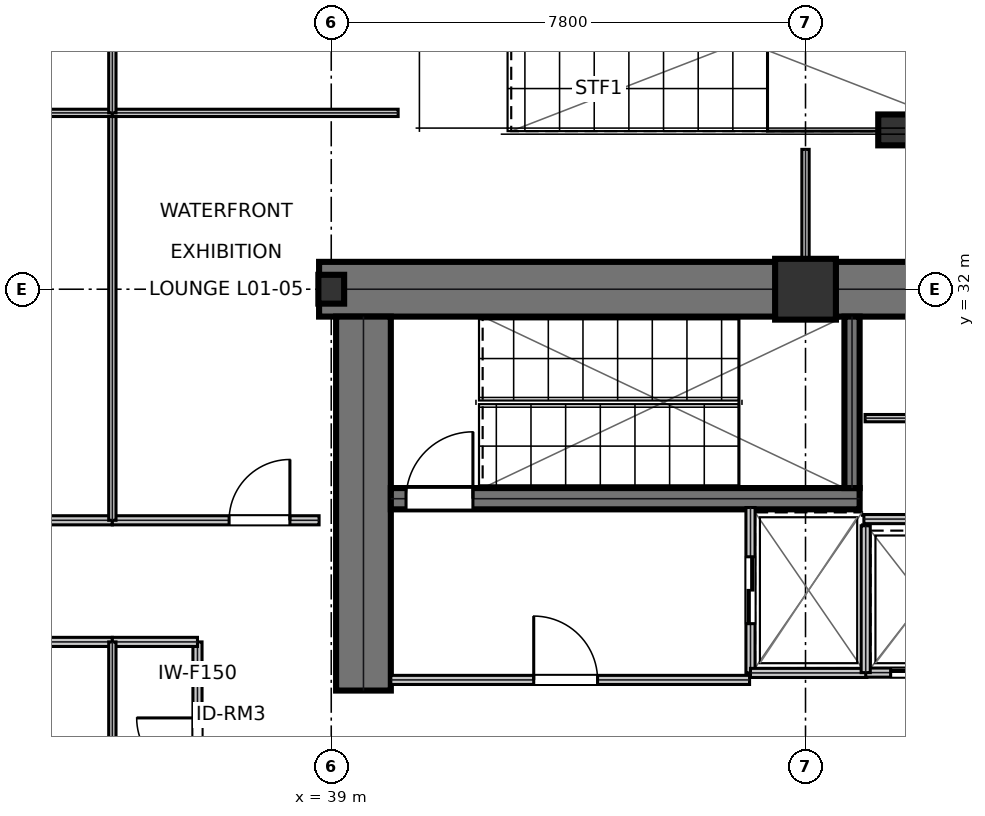
"""IFC4 building model, lengths in metres.
Left out: names, types, materials, properties, quantities, classifications, styles, units other than length and angle.
Written with IfcOpenShell. Run it as: python <this file> out.ifc"""

import sys

from ifc_helpers import new_model, si_unit, direction, frame, frame_2d, origin, origin_2d, place, context, subcontext, project, spatial, rectangle, hollow_circle, i_section, extrude, element, fill, save


model = new_model("IFC4")
c1 = context("Model", 3, precision=1e-05, world=origin(), true_north=direction((0.0, 1.0)))
c2 = subcontext(c1, "Body", "Model", "MODEL_VIEW")
j1 = project(units=[si_unit("LENGTHUNIT", "METRE"), si_unit("PLANEANGLEUNIT", "RADIAN")], contexts=[c1])
p1 = place(None, origin())
s1 = spatial("IfcSite", under=j1, at=p1, CompositionType="ELEMENT")
p2 = place(p1, origin())
s2 = spatial("IfcBuilding", under=s1, at=p2, CompositionType="ELEMENT")
p3 = place(p2, frame((0.0, 0.0, 5.4)))
s3 = spatial("IfcBuildingStorey", under=s2, at=p3, CompositionType="ELEMENT", Elevation=5.4)
p4 = place(p3, frame((38.8, 32.0, 0.0), z_axis=(0.0, 0.0, 1.0), x_axis=(1.0, 0.0, 0.0)))
e1 = element("IfcWall", 1, at=p4, inside=s3, PredefinedType="SHEAR", context=c2, shape_type="SweptSolid", body=[
    extrude(rectangle(XDim=16.0, YDim=0.9, at=frame_2d((8.0, 0.0))), origin(), (0.0, 0.0, 1.0), 5.12),
])
p5 = place(p3, frame((39.53, 25.4, 0.0), z_axis=(0.0, 0.0, 1.0), x_axis=(0.0, 1.0, 0.0)))
e2 = element("IfcWall", 2, at=p5, inside=s3, PredefinedType="SHEAR", context=c2, shape_type="SweptSolid", body=[
    extrude(rectangle(XDim=6.15, YDim=0.9, at=frame_2d((3.075, 0.0))), origin(), (0.0, 0.0, 1.0), 5.12),
])
p6 = place(p3, frame((39.98, 28.555, 0.0), z_axis=(0.0, 0.0, 1.0), x_axis=(1.0, 0.0, 0.0)))
e3 = element("IfcWall", 3, at=p6, inside=s3, PredefinedType="SHEAR", context=c2, shape_type="SweptSolid", body=[
    extrude(rectangle(XDim=7.71, YDim=0.35, at=frame_2d((3.855, 0.0))), origin(), (0.0, 0.0, 1.0), 5.12),
])
p7 = place(p6, frame((0.25, 0.0, 0.0)))
e4 = element("IfcOpeningElement", 4, at=p7, cuts=e3, PredefinedType="OPENING", context=c2, shape_type="SweptSolid", body=[
    extrude(rectangle(XDim=1.1, YDim=2.15, at=frame_2d((0.55, 1.075))), frame((0.0, 0.185, 0.0), z_axis=(0.0, -1.0, 0.0), x_axis=(1.0, 0.0, 0.0)), (0.0, 0.0, 1.0), 0.37),
])
p8 = place(p3, frame((47.565, 28.73, 0.0), z_axis=(0.0, 0.0, 1.0), x_axis=(0.0, 1.0, 0.0)))
e5 = element("IfcWall", 5, at=p8, inside=s3, PredefinedType="SHEAR", context=c2, shape_type="SweptSolid", body=[
    extrude(rectangle(XDim=2.82, YDim=0.25, at=frame_2d((1.41, 0.0))), origin(), (0.0, 0.0, 1.0), 5.12),
])
p9 = place(p3, frame((39.0, 32.0, 0.0), z_axis=(0.0, 0.0, 1.0), x_axis=(1.0, 0.0, 0.0)))
e6 = element("IfcColumn", 6, at=p9, inside=s3, PredefinedType="COLUMN", context=c2, shape_type="SweptSolid", body=[
    extrude(i_section(OverallWidth=0.424, OverallDepth=0.474, WebThickness=0.048, FlangeThickness=0.077, at=origin_2d()), origin(), (0.0, 0.0, 1.0), 5.395),
])
p10 = place(p3, frame((46.8, 32.0, 0.0), z_axis=(0.0, 0.0, 1.0), x_axis=(1.0, 0.0, 0.0)))
e7 = element("IfcColumn", 7, at=p10, inside=s3, PredefinedType="COLUMN", context=c2, shape_type="SweptSolid", body=[
    extrude(rectangle(XDim=1.0, YDim=1.0, at=origin_2d()), origin(), (0.0, 0.0, 1.0), 5.395),
])
p11 = place(p3, frame((48.25, 34.62, 0.0), z_axis=(0.0, 0.0, 1.0), x_axis=(1.0, 0.0, 0.0)))
e8 = element("IfcColumn", 8, at=p11, inside=s3, PredefinedType="COLUMN", context=c2, shape_type="SweptSolid", body=[
    extrude(hollow_circle(Radius=0.254, WallThickness=0.02, at=origin_2d()), origin(), (0.0, 0.0, 1.0), 5.394),
])
p12 = place(p3, frame((39.98, 25.575, 0.0), z_axis=(0.0, 0.0, 1.0), x_axis=(1.0, 0.0, 0.0)))
e9 = element("IfcWall", 9, at=p12, inside=s3, PredefinedType="PARTITIONING", context=c2, shape_type="SweptSolid", body=[
    extrude(rectangle(XDim=5.9, YDim=0.15, at=frame_2d((2.95, 0.0))), origin(), (0.0, 0.0, 1.0), 5.12),
])
p13 = place(p12, frame((2.35, 0.0, 0.0)))
e10 = element("IfcOpeningElement", 10, at=p13, cuts=e9, PredefinedType="OPENING", context=c2, shape_type="SweptSolid", body=[
    extrude(rectangle(XDim=1.05, YDim=2.15, at=frame_2d((0.525, 1.075))), frame((0.0, 0.085, 0.0), z_axis=(0.0, -1.0, 0.0), x_axis=(1.0, 0.0, 0.0)), (0.0, 0.0, 1.0), 0.17),
])
p14 = place(p3, frame((45.895, 25.69, 0.0), z_axis=(0.0, 0.0, 1.0), x_axis=(0.0, 1.0, 0.0)))
e11 = element("IfcWall", 11, at=p14, inside=s3, PredefinedType="PARTITIONING", context=c2, shape_type="SweptSolid", body=[
    extrude(rectangle(XDim=2.72, YDim=0.15, at=frame_2d((1.36, 0.0))), origin(), (0.0, 0.0, 1.0), 5.12),
])
p15 = place(p14, frame((0.81, 0.0, 0.0)))
e12 = element("IfcOpeningElement", 12, at=p15, cuts=e11, PredefinedType="OPENING", context=c2, shape_type="SweptSolid", body=[
    extrude(rectangle(XDim=1.1, YDim=2.15, at=frame_2d((0.55, 1.075))), frame((0.0, 0.085, 0.0), z_axis=(0.0, -1.0, 0.0), x_axis=(1.0, 0.0, 0.0)), (0.0, 0.0, 1.0), 0.17),
])
p16 = place(p3, frame((45.895, 25.69, 0.0), z_axis=(0.0, 0.0, 1.0), x_axis=(1.0, 0.0, 0.0)))
e13 = element("IfcWall", 13, at=p16, inside=s3, PredefinedType="PARTITIONING", context=c2, shape_type="SweptSolid", body=[
    extrude(rectangle(XDim=1.915, YDim=0.15, at=frame_2d((0.958, 0.0))), origin(), (0.0, 0.0, 1.0), 5.12),
])
p17 = place(p3, frame((47.79, 25.695, 0.0), z_axis=(0.0, 0.0, 1.0), x_axis=(1.0, 0.0, 0.0)))
e14 = element("IfcWall", 14, at=p17, inside=s3, PredefinedType="PARTITIONING", context=c2, shape_type="SweptSolid", body=[
    extrude(rectangle(XDim=1.92, YDim=0.15, at=frame_2d((0.96, 0.0))), origin(), (0.0, 0.0, 1.0), 5.12),
])
p18 = place(p17, frame((0.41, 0.0, 0.0)))
e15 = element("IfcOpeningElement", 15, at=p18, cuts=e14, PredefinedType="OPENING", context=c2, shape_type="SweptSolid", body=[
    extrude(rectangle(XDim=1.1, YDim=2.15, at=frame_2d((0.55, 1.075))), frame((0.0, 0.085, 0.0), z_axis=(0.0, -1.0, 0.0), x_axis=(1.0, 0.0, 0.0)), (0.0, 0.0, 1.0), 0.17),
])
p19 = place(p3, frame((47.79, 25.695, 0.0), z_axis=(0.0, 0.0, 1.0), x_axis=(0.0, 1.0, 0.0)))
e16 = element("IfcWall", 16, at=p19, inside=s3, PredefinedType="PARTITIONING", context=c2, shape_type="SweptSolid", body=[
    extrude(rectangle(XDim=2.415, YDim=0.15, at=frame_2d((1.208, 0.0))), origin(), (0.0, 0.0, 1.0), 5.12),
])
p20 = place(p3, frame((47.76, 28.22, 0.0), z_axis=(0.0, 0.0, 1.0), x_axis=(1.0, 0.0, 0.0)))
e17 = element("IfcWall", 17, at=p20, inside=s3, PredefinedType="PARTITIONING", context=c2, shape_type="SweptSolid", body=[
    extrude(rectangle(XDim=1.96, YDim=0.15, at=frame_2d((0.98, 0.0))), origin(), (0.0, 0.0, 1.0), 5.12),
])
p21 = place(p3, frame((47.78, 29.88, 0.0), z_axis=(0.0, 0.0, 1.0), x_axis=(1.0, 0.0, 0.0)))
e18 = element("IfcWall", 18, at=p21, inside=s3, PredefinedType="PARTITIONING", context=c2, shape_type="SweptSolid", body=[
    extrude(rectangle(XDim=1.92, YDim=0.12, at=frame_2d((0.96, 0.0))), origin(), (0.0, 0.0, 1.0), 5.12),
])
p22 = place(p3, frame((36.8, 22.7, 0.0), z_axis=(0.0, 0.0, 1.0), x_axis=(0.0, 1.0, 0.0)))
e19 = element("IfcWall", 19, at=p22, inside=s3, PredefinedType="PARTITIONING", context=c2, shape_type="SweptSolid", body=[
    extrude(rectangle(XDim=3.5, YDim=0.15, at=frame_2d((1.75, 0.0))), origin(), (0.0, 0.0, 1.0), 4.338),
])
p23 = place(p22, frame((1.25, 0.0, 0.0)))
e20 = element("IfcOpeningElement", 20, at=p23, cuts=e19, PredefinedType="OPENING", context=c2, shape_type="SweptSolid", body=[
    extrude(rectangle(XDim=1.0, YDim=2.15, at=frame_2d((0.5, 1.075))), frame((0.0, 0.085, 0.0), z_axis=(0.0, -1.0, 0.0), x_axis=(1.0, 0.0, 0.0)), (0.0, 0.0, 1.0), 0.17),
])
p24 = place(p3, frame((28.2, 26.2, 0.0), z_axis=(0.0, 0.0, 1.0), x_axis=(1.0, 0.0, 0.0)))
e21 = element("IfcWall", 21, at=p24, inside=s3, PredefinedType="PARTITIONING", context=c2, shape_type="SweptSolid", body=[
    extrude(rectangle(XDim=7.2, YDim=0.15, at=frame_2d((3.6, 0.0))), origin(), (0.0, 0.0, 1.0), 4.415),
])
p25 = place(p24, frame((3.1, 0.0, 0.0)))
e22 = element("IfcOpeningElement", 22, at=p25, cuts=e21, PredefinedType="OPENING", context=c2, shape_type="SweptSolid", body=[
    extrude(rectangle(XDim=1.0, YDim=2.15, at=frame_2d((0.5, 1.075))), frame((0.0, 0.085, 0.0), z_axis=(0.0, -1.0, 0.0), x_axis=(1.0, 0.0, 0.0)), (0.0, 0.0, 1.0), 0.17),
])
p26 = place(p3, frame((28.2, 28.2, 0.0), z_axis=(0.0, 0.0, 1.0), x_axis=(1.0, 0.0, 0.0)))
e23 = element("IfcWall", 23, at=p26, inside=s3, PredefinedType="PARTITIONING", context=c2, shape_type="SweptSolid", body=[
    extrude(rectangle(XDim=7.2, YDim=0.15, at=frame_2d((3.6, 0.0))), origin(), (0.0, 0.0, 1.0), 4.415),
])
p27 = place(p26, frame((3.1, 0.0, 0.0)))
e24 = element("IfcOpeningElement", 24, at=p27, cuts=e23, PredefinedType="OPENING", context=c2, shape_type="SweptSolid", body=[
    extrude(rectangle(XDim=1.0, YDim=2.15, at=frame_2d((0.5, 1.075))), frame((0.0, 0.085, 0.0), z_axis=(0.0, -1.0, 0.0), x_axis=(1.0, 0.0, 0.0)), (0.0, 0.0, 1.0), 0.17),
])
p28 = place(p3, frame((35.4, 28.2, 0.0), z_axis=(0.0, 0.0, 1.0), x_axis=(1.0, 0.0, 0.0)))
e25 = element("IfcWall", 25, at=p28, inside=s3, PredefinedType="PARTITIONING", context=c2, shape_type="SweptSolid", body=[
    extrude(rectangle(XDim=3.4, YDim=0.15, at=frame_2d((1.7, 0.0))), origin(), (0.0, 0.0, 1.0), 5.12),
])
p29 = place(p28, frame((1.92, 0.0, 0.0)))
e26 = element("IfcOpeningElement", 26, at=p29, cuts=e25, PredefinedType="OPENING", context=c2, shape_type="SweptSolid", body=[
    extrude(rectangle(XDim=1.0, YDim=2.15, at=frame_2d((0.5, 1.075))), frame((0.0, 0.085, 0.0), z_axis=(0.0, -1.0, 0.0), x_axis=(1.0, 0.0, 0.0)), (0.0, 0.0, 1.0), 0.17),
])
p30 = place(p3, frame((35.4, 26.2, 0.0), z_axis=(0.0, 0.0, 1.0), x_axis=(1.0, 0.0, 0.0)))
e27 = element("IfcWall", 27, at=p30, inside=s3, PredefinedType="PARTITIONING", context=c2, shape_type="SweptSolid", body=[
    extrude(rectangle(XDim=1.4, YDim=0.15, at=frame_2d((0.7, 0.0))), origin(), (0.0, 0.0, 1.0), 5.12),
])
p31 = place(p3, frame((35.4, 20.0, 0.0), z_axis=(0.0, 0.0, 1.0), x_axis=(0.0, 1.0, 0.0)))
e28 = element("IfcWall", 28, at=p31, inside=s3, PredefinedType="PARTITIONING", context=c2, shape_type="SweptSolid", body=[
    extrude(rectangle(XDim=6.2, YDim=0.12, at=frame_2d((3.1, 0.0))), origin(), (0.0, 0.0, 1.0), 4.338),
])
p32 = place(p3, frame((46.8, 32.4, 0.0), z_axis=(0.0, 0.0, 1.0), x_axis=(0.0, 1.0, 0.0)))
e29 = element("IfcWall", 29, at=p32, inside=s3, PredefinedType="PARTITIONING", context=c2, shape_type="SweptSolid", body=[
    extrude(rectangle(XDim=1.9, YDim=0.12, at=frame_2d((0.95, 0.0))), origin(), (0.0, 0.0, 1.0), 5.12),
])
p33 = place(p3, frame((35.4, 28.2, 0.0), z_axis=(0.0, 0.0, 1.0), x_axis=(0.0, 1.0, 0.0)))
e30 = element("IfcWall", 30, at=p33, inside=s3, PredefinedType="PARTITIONING", context=c2, shape_type="SweptSolid", body=[
    extrude(rectangle(XDim=6.7, YDim=0.12, at=frame_2d((3.35, 0.0))), origin(), (0.0, 0.0, 1.0), 4.338),
])
p34 = place(p3, frame((28.2, 34.9, 0.0), z_axis=(0.0, 0.0, 1.0), x_axis=(1.0, 0.0, 0.0)))
e31 = element("IfcWall", 31, at=p34, inside=s3, PredefinedType="PARTITIONING", context=c2, shape_type="SweptSolid", body=[
    extrude(rectangle(XDim=7.2, YDim=0.12, at=frame_2d((3.6, 0.0))), origin(), (0.0, 0.0, 1.0), 4.415),
])
p35 = place(p3, frame((35.4, 34.9, 0.0), z_axis=(0.0, 0.0, 1.0), x_axis=(1.0, 0.0, 0.0)))
e32 = element("IfcWall", 32, at=p35, inside=s3, PredefinedType="PARTITIONING", context=c2, shape_type="SweptSolid", body=[
    extrude(rectangle(XDim=4.7, YDim=0.12, at=frame_2d((2.35, 0.0))), origin(), (0.0, 0.0, 1.0), 4.415),
])
p36 = place(p3, frame((35.4, 34.9, 0.0), z_axis=(0.0, 0.0, 1.0), x_axis=(0.0, 1.0, 0.0)))
e33 = element("IfcWall", 33, at=p36, inside=s3, PredefinedType="PARTITIONING", context=c2, shape_type="SweptSolid", body=[
    extrude(rectangle(XDim=7.3, YDim=0.12, at=frame_2d((3.65, 0.0))), origin(), (0.0, 0.0, 1.0), 4.338),
])
p37 = place(p13, origin())
e34 = element("IfcDoor", 34, at=p37, inside=s3, OperationType="SINGLE_SWING_LEFT", PredefinedType="DOOR", context=c2, shape_type="SweptSolid", body=[
    extrude(rectangle(XDim=1.05, YDim=2.15, at=frame_2d((0.525, 1.075))), frame((0.0, 0.025, 0.0), z_axis=(0.0, -1.0, 0.0), x_axis=(1.0, 0.0, 0.0)), (0.0, 0.0, 1.0), 0.05),
])
fill(e10, e34)
p38 = place(p15, frame((1.1, 0.0, 0.0), z_axis=(0.0, 0.0, 1.0), x_axis=(-1.0, 0.0, 0.0)))
e35 = element("IfcDoor", 35, at=p38, inside=s3, OperationType="DOUBLE_DOOR_SLIDING", PredefinedType="DOOR", context=c2, shape_type="SweptSolid", body=[
    extrude(rectangle(XDim=1.1, YDim=2.15, at=frame_2d((0.55, 1.075))), frame((0.0, 0.025, 0.0), z_axis=(0.0, -1.0, 0.0), x_axis=(1.0, 0.0, 0.0)), (0.0, 0.0, 1.0), 0.05),
])
fill(e12, e35)
p39 = place(p18, frame((1.1, 0.0, 0.0), z_axis=(0.0, 0.0, 1.0), x_axis=(-1.0, 0.0, 0.0)))
e36 = element("IfcDoor", 36, at=p39, inside=s3, OperationType="DOUBLE_DOOR_SLIDING", PredefinedType="DOOR", context=c2, shape_type="SweptSolid", body=[
    extrude(rectangle(XDim=1.1, YDim=2.15, at=frame_2d((0.55, 1.075))), frame((0.0, 0.025, 0.0), z_axis=(0.0, -1.0, 0.0), x_axis=(1.0, 0.0, 0.0)), (0.0, 0.0, 1.0), 0.05),
])
fill(e15, e36)
p40 = place(p23, origin())
e37 = element("IfcDoor", 37, at=p40, inside=s3, OperationType="SINGLE_SWING_RIGHT", PredefinedType="DOOR", context=c2, shape_type="SweptSolid", body=[
    extrude(rectangle(XDim=1.0, YDim=2.15, at=frame_2d((0.5, 1.075))), frame((0.0, 0.025, 0.0), z_axis=(0.0, -1.0, 0.0), x_axis=(1.0, 0.0, 0.0)), (0.0, 0.0, 1.0), 0.05),
])
fill(e20, e37)
p41 = place(p29, origin())
e38 = element("IfcDoor", 38, at=p41, inside=s3, OperationType="SINGLE_SWING_RIGHT", PredefinedType="DOOR", context=c2, shape_type="SweptSolid", body=[
    extrude(rectangle(XDim=1.0, YDim=2.15, at=frame_2d((0.5, 1.075))), frame((0.0, 0.025, 0.0), z_axis=(0.0, -1.0, 0.0), x_axis=(1.0, 0.0, 0.0)), (0.0, 0.0, 1.0), 0.05),
])
fill(e26, e38)
p42 = place(p7, origin())
e39 = element("IfcDoor", 39, at=p42, inside=s3, OperationType="SINGLE_SWING_RIGHT", PredefinedType="DOOR", context=c2, shape_type="SweptSolid", body=[
    extrude(rectangle(XDim=1.1, YDim=2.15, at=frame_2d((0.55, 1.075))), frame((0.0, 0.025, 0.0), z_axis=(0.0, -1.0, 0.0), x_axis=(1.0, 0.0, 0.0)), (0.0, 0.0, 1.0), 0.05),
])
fill(e4, e39)
save(model, sys.argv[1])
